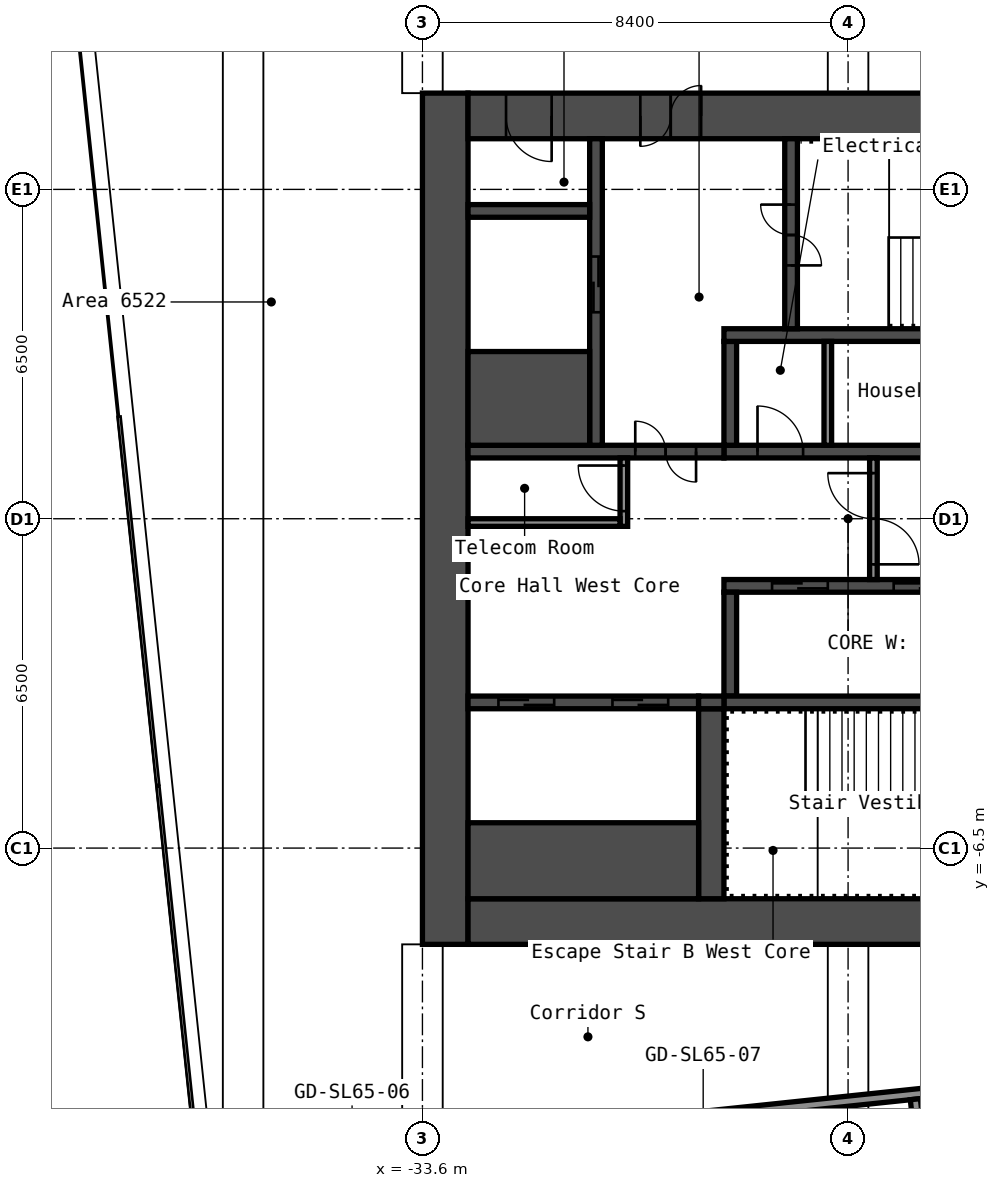
"""IFC4 building model, lengths in metres.
Left out: names, types, materials, properties, quantities, classifications, styles, units other than length and angle.
Written with IfcOpenShell. Run it as: python <this file> out.ifc"""

import sys

from ifc_helpers import new_model, si_unit, direction, frame, frame_2d, origin, place, context, subcontext, project, spatial, rectangle, extrude, element, fill, save


model = new_model("IFC4")
c1 = context("Model", 3, precision=1e-05, world=origin(), true_north=direction((0.0, 1.0)))
c2 = subcontext(c1, "Body", "Model", "MODEL_VIEW")
j1 = project(units=[si_unit("LENGTHUNIT", "METRE"), si_unit("PLANEANGLEUNIT", "RADIAN")], contexts=[c1])
p1 = place(None, origin())
s1 = spatial("IfcSite", under=j1, at=p1, CompositionType="ELEMENT")
p2 = place(p1, origin())
s2 = spatial("IfcBuilding", under=s1, at=p2, CompositionType="ELEMENT")
p3 = place(p2, frame((0.0, 0.0, 228.2)))
s3 = spatial("IfcBuildingStorey", under=s2, at=p3, CompositionType="ELEMENT", Elevation=228.2)
p4 = place(p3, frame((-33.15, -8.4, 0.0), z_axis=(0.0, 0.0, 1.0), x_axis=(0.0, 1.0, 0.0)))
e1 = element("IfcWall", 1, at=p4, inside=s3, PredefinedType="SHEAR", context=c2, shape_type="SweptSolid", body=[
    extrude(rectangle(XDim=16.8, YDim=0.9, at=frame_2d((8.4, 0.0))), origin(), (0.0, 0.0, 1.0), 4.1),
])
p5 = place(p3, frame((-32.7, 7.95, 0.0), z_axis=(0.0, 0.0, 1.0), x_axis=(1.0, 0.0, 0.0)))
e2 = element("IfcWall", 2, at=p5, inside=s3, PredefinedType="SHEAR", context=c2, shape_type="SweptSolid", body=[
    extrude(rectangle(XDim=15.0, YDim=0.9, at=frame_2d((7.5, 0.0))), origin(), (0.0, 0.0, 1.0), 4.1),
])
p6 = place(p5, frame((3.4, 0.0, 0.0)))
e3 = element("IfcOpeningElement", 3, at=p6, cuts=e2, PredefinedType="OPENING", context=c2, shape_type="SweptSolid", body=[
    extrude(rectangle(XDim=1.2, YDim=2.1, at=frame_2d((0.6, 1.05))), frame((0.0, 0.46, 0.0), z_axis=(0.0, -1.0, 0.0), x_axis=(1.0, 0.0, 0.0)), (0.0, 0.0, 1.0), 0.92),
])
p7 = place(p5, frame((0.75, 0.0, 0.0)))
e4 = element("IfcOpeningElement", 4, at=p7, cuts=e2, PredefinedType="OPENING", context=c2, shape_type="SweptSolid", body=[
    extrude(rectangle(XDim=0.9, YDim=2.1, at=frame_2d((0.45, 1.05))), frame((0.0, 0.46, 0.0), z_axis=(0.0, -1.0, 0.0), x_axis=(1.0, 0.0, 0.0)), (0.0, 0.0, 1.0), 0.92),
])
p8 = place(p3, frame((-32.7, -7.95, 0.0), z_axis=(0.0, 0.0, 1.0), x_axis=(1.0, 0.0, 0.0)))
e5 = element("IfcWall", 5, at=p8, inside=s3, PredefinedType="SHEAR", context=c2, shape_type="SweptSolid", body=[
    extrude(rectangle(XDim=15.0, YDim=0.9, at=frame_2d((7.5, 0.0))), origin(), (0.0, 0.0, 1.0), 4.1),
])
p9 = place(p8, frame((11.45, 0.0, 0.0)))
e6 = element("IfcOpeningElement", 6, at=p9, cuts=e5, PredefinedType="OPENING", context=c2, shape_type="SweptSolid", body=[
    extrude(rectangle(XDim=1.0, YDim=2.1, at=frame_2d((0.5, 1.05))), frame((0.0, 0.46, 0.0), z_axis=(0.0, -1.0, 0.0), x_axis=(1.0, 0.0, 0.0)), (0.0, 0.0, 1.0), 0.92),
])
p10 = place(p3, frame((-27.65, 1.325, 0.0), z_axis=(0.0, 0.0, 1.0), x_axis=(1.0, 0.0, 0.0)))
e7 = element("IfcWall", 7, at=p10, inside=s3, PredefinedType="SHEAR", context=c2, shape_type="SweptSolid", body=[
    extrude(rectangle(XDim=7.5, YDim=0.25, at=frame_2d((3.75, 0.0))), origin(), (0.0, 0.0, 1.0), 4.1),
])
p11 = place(p10, frame((4.363, 0.0, 0.0)))
e8 = element("IfcOpeningElement", 8, at=p11, cuts=e7, PredefinedType="OPENING", context=c2, shape_type="SweptSolid", body=[
    extrude(rectangle(XDim=0.9, YDim=2.1, at=frame_2d((0.45, 1.05))), frame((0.0, 0.135, 0.0), z_axis=(0.0, -1.0, 0.0), x_axis=(1.0, 0.0, 0.0)), (0.0, 0.0, 1.0), 0.27),
])
p12 = place(p10, frame((0.663, 0.0, 0.0)))
e9 = element("IfcOpeningElement", 9, at=p12, cuts=e7, PredefinedType="OPENING", context=c2, shape_type="SweptSolid", body=[
    extrude(rectangle(XDim=0.9, YDim=2.1, at=frame_2d((0.45, 1.05))), frame((0.0, 0.135, 0.0), z_axis=(0.0, -1.0, 0.0), x_axis=(1.0, 0.0, 0.0)), (0.0, 0.0, 1.0), 0.27),
])
p13 = place(p3, frame((-27.525, 1.45, 0.0), z_axis=(0.0, 0.0, 1.0), x_axis=(0.0, 1.0, 0.0)))
e10 = element("IfcWall", 10, at=p13, inside=s3, PredefinedType="SHEAR", context=c2, shape_type="SweptSolid", body=[
    extrude(rectangle(XDim=2.05, YDim=0.25, at=frame_2d((1.025, 0.0))), origin(), (0.0, 0.0, 1.0), 4.1),
])
p14 = place(p3, frame((-27.65, 3.625, 0.0), z_axis=(0.0, 0.0, 1.0), x_axis=(1.0, 0.0, 0.0)))
e11 = element("IfcWall", 11, at=p14, inside=s3, PredefinedType="SHEAR", context=c2, shape_type="SweptSolid", body=[
    extrude(rectangle(XDim=7.5, YDim=0.25, at=frame_2d((3.75, 0.0))), origin(), (0.0, 0.0, 1.0), 4.1),
])
p15 = place(p3, frame((-26.325, 3.75, 0.0), z_axis=(0.0, 0.0, 1.0), x_axis=(0.0, 1.0, 0.0)))
e12 = element("IfcWall", 12, at=p15, inside=s3, PredefinedType="SHEAR", context=c2, shape_type="SweptSolid", body=[
    extrude(rectangle(XDim=3.75, YDim=0.25, at=frame_2d((1.875, 0.0))), origin(), (0.0, 0.0, 1.0), 4.1),
])
p16 = place(p15, frame((1.25, 0.0, 0.0)))
e13 = element("IfcOpeningElement", 13, at=p16, cuts=e12, PredefinedType="OPENING", context=c2, shape_type="SweptSolid", body=[
    extrude(rectangle(XDim=1.2, YDim=2.1, at=frame_2d((0.6, 1.05))), frame((0.0, 0.135, 0.0), z_axis=(0.0, -1.0, 0.0), x_axis=(1.0, 0.0, 0.0)), (0.0, 0.0, 1.0), 0.27),
])
p17 = place(p3, frame((-32.7, 1.325, 0.0), z_axis=(0.0, 0.0, 1.0), x_axis=(1.0, 0.0, 0.0)))
e14 = element("IfcWall", 14, at=p17, inside=s3, PredefinedType="SHEAR", context=c2, shape_type="SweptSolid", body=[
    extrude(rectangle(XDim=5.05, YDim=0.25, at=frame_2d((2.525, 0.0))), origin(), (0.0, 0.0, 1.0), 4.1),
])
p18 = place(p17, frame((3.3, 0.0, 0.0)))
e15 = element("IfcOpeningElement", 15, at=p18, cuts=e14, PredefinedType="OPENING", context=c2, shape_type="SweptSolid", body=[
    extrude(rectangle(XDim=1.2, YDim=2.1, at=frame_2d((0.6, 1.05))), frame((0.0, 0.135, 0.0), z_axis=(0.0, -1.0, 0.0), x_axis=(1.0, 0.0, 0.0)), (0.0, 0.0, 1.0), 0.27),
])
p19 = place(p3, frame((-30.175, 1.45, 0.0), z_axis=(0.0, 0.0, 1.0), x_axis=(0.0, 1.0, 0.0)))
e16 = element("IfcWall", 16, at=p19, inside=s3, PredefinedType="SHEAR", context=c2, shape_type="SweptSolid", body=[
    extrude(rectangle(XDim=6.05, YDim=0.25, at=frame_2d((3.025, 0.0))), origin(), (0.0, 0.0, 1.0), 4.1),
])
p20 = place(p19, frame((2.625, 0.0, 0.0)))
e17 = element("IfcOpeningElement", 17, at=p20, cuts=e16, PredefinedType="OPENING", context=c2, shape_type="SweptSolid", body=[
    extrude(rectangle(XDim=1.1, YDim=2.1, at=frame_2d((0.55, 1.05))), frame((0.0, 0.135, 0.0), z_axis=(0.0, -1.0, 0.0), x_axis=(1.0, 0.0, 0.0)), (0.0, 0.0, 1.0), 0.27),
])
p21 = place(p3, frame((-32.7, 2.375, 0.0), z_axis=(0.0, 0.0, 1.0), x_axis=(1.0, 0.0, 0.0)))
e18 = element("IfcWall", 18, at=p21, inside=s3, PredefinedType="SHEAR", context=c2, shape_type="SweptSolid", body=[
    extrude(rectangle(XDim=2.4, YDim=1.85, at=frame_2d((1.2, 0.0))), origin(), (0.0, 0.0, 1.0), 4.1),
])
p22 = place(p3, frame((-32.7, 6.075, 0.0), z_axis=(0.0, 0.0, 1.0), x_axis=(1.0, 0.0, 0.0)))
e19 = element("IfcWall", 19, at=p22, inside=s3, PredefinedType="SHEAR", context=c2, shape_type="SweptSolid", body=[
    extrude(rectangle(XDim=2.4, YDim=0.25, at=frame_2d((1.2, 0.0))), origin(), (0.0, 0.0, 1.0), 4.1),
])
p23 = place(p3, frame((-27.65, -1.325, 0.0), z_axis=(0.0, 0.0, 1.0), x_axis=(1.0, 0.0, 0.0)))
e20 = element("IfcWall", 20, at=p23, inside=s3, PredefinedType="SHEAR", context=c2, shape_type="SweptSolid", body=[
    extrude(rectangle(XDim=7.5, YDim=0.25, at=frame_2d((3.75, 0.0))), origin(), (0.0, 0.0, 1.0), 4.1),
])
p24 = place(p23, frame((5.75, 0.0, 0.0)))
e21 = element("IfcOpeningElement", 21, at=p24, cuts=e20, PredefinedType="OPENING", context=c2, shape_type="SweptSolid", body=[
    extrude(rectangle(XDim=1.1, YDim=2.1, at=frame_2d((0.55, 1.05))), frame((0.0, 0.135, 0.0), z_axis=(0.0, -1.0, 0.0), x_axis=(1.0, 0.0, 0.0)), (0.0, 0.0, 1.0), 0.27),
])
p25 = place(p23, frame((3.35, 0.0, 0.0)))
e22 = element("IfcOpeningElement", 22, at=p25, cuts=e20, PredefinedType="OPENING", context=c2, shape_type="SweptSolid", body=[
    extrude(rectangle(XDim=1.1, YDim=2.1, at=frame_2d((0.55, 1.05))), frame((0.0, 0.135, 0.0), z_axis=(0.0, -1.0, 0.0), x_axis=(1.0, 0.0, 0.0)), (0.0, 0.0, 1.0), 0.27),
])
p26 = place(p23, frame((0.95, 0.0, 0.0)))
e23 = element("IfcOpeningElement", 23, at=p26, cuts=e20, PredefinedType="OPENING", context=c2, shape_type="SweptSolid", body=[
    extrude(rectangle(XDim=1.1, YDim=2.1, at=frame_2d((0.55, 1.05))), frame((0.0, 0.135, 0.0), z_axis=(0.0, -1.0, 0.0), x_axis=(1.0, 0.0, 0.0)), (0.0, 0.0, 1.0), 0.27),
])
p27 = place(p3, frame((-27.525, -3.5, 0.0), z_axis=(0.0, 0.0, 1.0), x_axis=(0.0, 1.0, 0.0)))
e24 = element("IfcWall", 24, at=p27, inside=s3, PredefinedType="SHEAR", context=c2, shape_type="SweptSolid", body=[
    extrude(rectangle(XDim=2.05, YDim=0.25, at=frame_2d((1.025, 0.0))), origin(), (0.0, 0.0, 1.0), 4.1),
])
p28 = place(p3, frame((-27.65, -3.625, 0.0), z_axis=(0.0, 0.0, 1.0), x_axis=(1.0, 0.0, 0.0)))
e25 = element("IfcWall", 25, at=p28, inside=s3, PredefinedType="SHEAR", context=c2, shape_type="SweptSolid", body=[
    extrude(rectangle(XDim=7.5, YDim=0.25, at=frame_2d((3.75, 0.0))), origin(), (0.0, 0.0, 1.0), 4.1),
])
p29 = place(p3, frame((-27.9, -7.5, 0.0), z_axis=(0.0, 0.0, 1.0), x_axis=(0.0, 1.0, 0.0)))
e26 = element("IfcWall", 26, at=p29, inside=s3, PredefinedType="SHEAR", context=c2, shape_type="SweptSolid", body=[
    extrude(rectangle(XDim=3.75, YDim=0.5, at=frame_2d((1.875, 0.0))), origin(), (0.0, 0.0, 1.0), 4.1),
])
p30 = place(p3, frame((-32.7, -3.625, 0.0), z_axis=(0.0, 0.0, 1.0), x_axis=(1.0, 0.0, 0.0)))
e27 = element("IfcWall", 27, at=p30, inside=s3, PredefinedType="SHEAR", context=c2, shape_type="SweptSolid", body=[
    extrude(rectangle(XDim=4.55, YDim=0.25, at=frame_2d((2.275, 0.0))), origin(), (0.0, 0.0, 1.0), 4.1),
])
p31 = place(p30, frame((2.85, 0.0, 0.0)))
e28 = element("IfcOpeningElement", 28, at=p31, cuts=e27, PredefinedType="OPENING", context=c2, shape_type="SweptSolid", body=[
    extrude(rectangle(XDim=1.1, YDim=2.1, at=frame_2d((0.55, 1.05))), frame((0.0, 0.135, 0.0), z_axis=(0.0, -1.0, 0.0), x_axis=(1.0, 0.0, 0.0)), (0.0, 0.0, 1.0), 0.27),
])
p32 = place(p30, frame((0.6, 0.0, 0.0)))
e29 = element("IfcOpeningElement", 29, at=p32, cuts=e27, PredefinedType="OPENING", context=c2, shape_type="SweptSolid", body=[
    extrude(rectangle(XDim=1.1, YDim=2.1, at=frame_2d((0.55, 1.05))), frame((0.0, 0.135, 0.0), z_axis=(0.0, -1.0, 0.0), x_axis=(1.0, 0.0, 0.0)), (0.0, 0.0, 1.0), 0.27),
])
p33 = place(p3, frame((-32.7, -6.75, 0.0), z_axis=(0.0, 0.0, 1.0), x_axis=(1.0, 0.0, 0.0)))
e30 = element("IfcWall", 30, at=p33, inside=s3, PredefinedType="SHEAR", context=c2, shape_type="SweptSolid", body=[
    extrude(rectangle(XDim=4.55, YDim=1.5, at=frame_2d((2.275, 0.0))), origin(), (0.0, 0.0, 1.0), 4.1),
])
p34 = place(p3, frame((-28.15, -3.625, 0.0), z_axis=(0.0, 0.0, 1.0), x_axis=(1.0, 0.0, 0.0)))
e31 = element("IfcWall", 31, at=p34, inside=s3, PredefinedType="SHEAR", context=c2, shape_type="SweptSolid", body=[
    extrude(rectangle(XDim=0.5, YDim=0.25, at=frame_2d((0.25, 0.0))), origin(), (0.0, 0.0, 1.0), 4.1),
])
p35 = place(p3, frame((-24.7, -1.2, 0.0), z_axis=(0.0, 0.0, 1.0), x_axis=(0.0, 1.0, 0.0)))
e32 = element("IfcWall", 32, at=p35, inside=s3, PredefinedType="PARTITIONING", context=c2, shape_type="SweptSolid", body=[
    extrude(rectangle(XDim=2.4, YDim=0.15, at=frame_2d((1.2, 0.0))), origin(), (0.0, 0.0, 1.0), 4.1),
])
p36 = place(p35, frame((0.3, 0.0, 0.0)))
e33 = element("IfcOpeningElement", 33, at=p36, cuts=e32, PredefinedType="OPENING", context=c2, shape_type="SweptSolid", body=[
    extrude(rectangle(XDim=1.8, YDim=2.1, at=frame_2d((0.9, 1.05))), frame((0.0, 0.085, 0.0), z_axis=(0.0, -1.0, 0.0), x_axis=(1.0, 0.0, 0.0)), (0.0, 0.0, 1.0), 0.17),
])
p37 = place(p3, frame((-29.625, -0.15, 0.0), z_axis=(0.0, 0.0, 1.0), x_axis=(0.0, 1.0, 0.0)))
e34 = element("IfcWall", 34, at=p37, inside=s3, PredefinedType="PARTITIONING", context=c2, shape_type="SweptSolid", body=[
    extrude(rectangle(XDim=1.35, YDim=0.15, at=frame_2d((0.675, 0.0))), origin(), (0.0, 0.0, 1.0), 4.1),
])
p38 = place(p37, frame((0.3, 0.0, 0.0)))
e35 = element("IfcOpeningElement", 35, at=p38, cuts=e34, PredefinedType="OPENING", context=c2, shape_type="SweptSolid", body=[
    extrude(rectangle(XDim=0.9, YDim=2.1, at=frame_2d((0.45, 1.05))), frame((0.0, 0.085, 0.0), z_axis=(0.0, -1.0, 0.0), x_axis=(1.0, 0.0, 0.0)), (0.0, 0.0, 1.0), 0.17),
])
p39 = place(p3, frame((-32.7, -0.075, 0.0), z_axis=(0.0, 0.0, 1.0), x_axis=(1.0, 0.0, 0.0)))
e36 = element("IfcWall", 36, at=p39, inside=s3, PredefinedType="PARTITIONING", context=c2, shape_type="SweptSolid", body=[
    extrude(rectangle(XDim=3.0, YDim=0.15, at=frame_2d((1.5, 0.0))), origin(), (0.0, 0.0, 1.0), 4.1),
])
p40 = place(p3, frame((-25.6, 1.45, 0.0), z_axis=(0.0, 0.0, 1.0), x_axis=(0.0, 1.0, 0.0)))
e37 = element("IfcWall", 37, at=p40, inside=s3, PredefinedType="PARTITIONING", context=c2, shape_type="SweptSolid", body=[
    extrude(rectangle(XDim=2.05, YDim=0.15, at=frame_2d((1.025, 0.0))), origin(), (0.0, 0.0, 1.0), 4.1),
])
p41 = place(p3, frame((-38.039, -12.844, 0.0), z_axis=(0.0, 0.0, 1.0), x_axis=(0.994521812173, 0.104529254816, 0.0)))
e38 = element("IfcWall", 38, at=p41, inside=s3, PredefinedType="PARTITIONING", context=c2, shape_type="SweptSolid", body=[
    extrude(rectangle(XDim=22.635, YDim=0.2, at=frame_2d((11.317, 0.0))), origin(), (0.0, 0.0, 1.0), 4.1),
])
p42 = place(p41, frame((2.567, 0.0, 0.0)))
e39 = element("IfcOpeningElement", 39, at=p42, cuts=e38, PredefinedType="OPENING", context=c2, shape_type="SweptSolid", body=[
    extrude(rectangle(XDim=1.0, YDim=2.1, at=frame_2d((0.5, 1.05))), frame((0.0, 0.11, 0.0), z_axis=(0.0, -1.0, 0.0), x_axis=(1.0, 0.0, 0.0)), (0.0, 0.0, 1.0), 0.22),
])
p43 = place(p41, frame((9.585, 0.0, 0.0)))
e40 = element("IfcOpeningElement", 40, at=p43, cuts=e38, PredefinedType="OPENING", context=c2, shape_type="SweptSolid", body=[
    extrude(rectangle(XDim=0.9, YDim=2.1, at=frame_2d((0.45, 1.05))), frame((0.0, 0.11, 0.0), z_axis=(0.0, -1.0, 0.0), x_axis=(1.0, 0.0, 0.0)), (0.0, 0.0, 1.0), 0.22),
])
p44 = place(p41, frame((17.985, 0.0, 0.0)))
e41 = element("IfcOpeningElement", 41, at=p44, cuts=e38, PredefinedType="OPENING", context=c2, shape_type="SweptSolid", body=[
    extrude(rectangle(XDim=0.9, YDim=2.1, at=frame_2d((0.45, 1.05))), frame((0.0, 0.11, 0.0), z_axis=(0.0, -1.0, 0.0), x_axis=(1.0, 0.0, 0.0)), (0.0, 0.0, 1.0), 0.22),
])
p45 = place(p3, frame((-22.805, -21.606, 0.0), z_axis=(0.0, 0.0, 1.0), x_axis=(-0.104535358167, 0.994521170661, 0.0)))
e42 = element("IfcWall", 42, at=p45, inside=s3, PredefinedType="PARTITIONING", context=c2, shape_type="SweptSolid", body=[
    extrude(rectangle(XDim=10.206, YDim=0.2, at=frame_2d((5.103, 0.0))), origin(), (0.0, 0.0, 1.0), 4.1),
])
p46 = place(p6, origin())
e43 = element("IfcDoor", 43, at=p46, inside=s3, OperationType="DOUBLE_DOOR_SINGLE_SWING", PredefinedType="DOOR", context=c2, shape_type="SweptSolid", body=[
    extrude(rectangle(XDim=1.2, YDim=2.1, at=frame_2d((0.6, 1.05))), frame((0.0, 0.025, 0.0), z_axis=(0.0, -1.0, 0.0), x_axis=(1.0, 0.0, 0.0)), (0.0, 0.0, 1.0), 0.05),
])
fill(e3, e43)
p47 = place(p7, origin())
e44 = element("IfcDoor", 44, at=p47, inside=s3, OperationType="SINGLE_SWING_RIGHT", PredefinedType="DOOR", context=c2, shape_type="SweptSolid", body=[
    extrude(rectangle(XDim=0.9, YDim=2.1, at=frame_2d((0.45, 1.05))), frame((0.0, 0.025, 0.0), z_axis=(0.0, -1.0, 0.0), x_axis=(1.0, 0.0, 0.0)), (0.0, 0.0, 1.0), 0.05),
])
fill(e4, e44)
p48 = place(p16, origin())
e45 = element("IfcDoor", 45, at=p48, inside=s3, OperationType="DOUBLE_DOOR_SINGLE_SWING", PredefinedType="DOOR", context=c2, shape_type="SweptSolid", body=[
    extrude(rectangle(XDim=1.2, YDim=2.1, at=frame_2d((0.6, 1.05))), frame((0.0, 0.025, 0.0), z_axis=(0.0, -1.0, 0.0), x_axis=(1.0, 0.0, 0.0)), (0.0, 0.0, 1.0), 0.05),
])
fill(e13, e45)
p49 = place(p18, origin())
e46 = element("IfcDoor", 46, at=p49, inside=s3, OperationType="DOUBLE_DOOR_SINGLE_SWING", PredefinedType="DOOR", context=c2, shape_type="SweptSolid", body=[
    extrude(rectangle(XDim=1.2, YDim=2.1, at=frame_2d((0.6, 1.05))), frame((0.0, 0.025, 0.0), z_axis=(0.0, -1.0, 0.0), x_axis=(1.0, 0.0, 0.0)), (0.0, 0.0, 1.0), 0.05),
])
fill(e15, e46)
p50 = place(p36, origin())
e47 = element("IfcDoor", 47, at=p50, inside=s3, OperationType="DOUBLE_DOOR_SINGLE_SWING", PredefinedType="DOOR", context=c2, shape_type="SweptSolid", body=[
    extrude(rectangle(XDim=1.8, YDim=2.1, at=frame_2d((0.9, 1.05))), frame((0.0, 0.025, 0.0), z_axis=(0.0, -1.0, 0.0), x_axis=(1.0, 0.0, 0.0)), (0.0, 0.0, 1.0), 0.05),
])
fill(e33, e47)
p51 = place(p38, origin())
e48 = element("IfcDoor", 48, at=p51, inside=s3, OperationType="SINGLE_SWING_LEFT", PredefinedType="DOOR", context=c2, shape_type="SweptSolid", body=[
    extrude(rectangle(XDim=0.9, YDim=2.1, at=frame_2d((0.45, 1.05))), frame((0.0, 0.025, 0.0), z_axis=(0.0, -1.0, 0.0), x_axis=(1.0, 0.0, 0.0)), (0.0, 0.0, 1.0), 0.05),
])
fill(e35, e48)
p52 = place(p12, origin())
e49 = element("IfcDoor", 49, at=p52, inside=s3, OperationType="SINGLE_SWING_RIGHT", PredefinedType="DOOR", context=c2, shape_type="SweptSolid", body=[
    extrude(rectangle(XDim=0.9, YDim=2.1, at=frame_2d((0.45, 1.05))), frame((0.0, 0.025, 0.0), z_axis=(0.0, -1.0, 0.0), x_axis=(1.0, 0.0, 0.0)), (0.0, 0.0, 1.0), 0.05),
])
fill(e9, e49)
p53 = place(p25, origin())
e50 = element("IfcDoor", 50, at=p53, inside=s3, OperationType="DOUBLE_DOOR_SLIDING", PredefinedType="DOOR", context=c2, shape_type="SweptSolid", body=[
    extrude(rectangle(XDim=1.1, YDim=2.1, at=frame_2d((0.55, 1.05))), frame((0.0, 0.025, 0.0), z_axis=(0.0, -1.0, 0.0), x_axis=(1.0, 0.0, 0.0)), (0.0, 0.0, 1.0), 0.05),
])
fill(e22, e50)
p54 = place(p26, origin())
e51 = element("IfcDoor", 51, at=p54, inside=s3, OperationType="DOUBLE_DOOR_SLIDING", PredefinedType="DOOR", context=c2, shape_type="SweptSolid", body=[
    extrude(rectangle(XDim=1.1, YDim=2.1, at=frame_2d((0.55, 1.05))), frame((0.0, 0.025, 0.0), z_axis=(0.0, -1.0, 0.0), x_axis=(1.0, 0.0, 0.0)), (0.0, 0.0, 1.0), 0.05),
])
fill(e23, e51)
p55 = place(p20, origin())
e52 = element("IfcDoor", 52, at=p55, inside=s3, OperationType="DOUBLE_DOOR_SLIDING", PredefinedType="DOOR", context=c2, shape_type="SweptSolid", body=[
    extrude(rectangle(XDim=1.1, YDim=2.1, at=frame_2d((0.55, 1.05))), frame((0.0, 0.025, 0.0), z_axis=(0.0, -1.0, 0.0), x_axis=(1.0, 0.0, 0.0)), (0.0, 0.0, 1.0), 0.05),
])
fill(e17, e52)
p56 = place(p31, origin())
e53 = element("IfcDoor", 53, at=p56, inside=s3, OperationType="DOUBLE_DOOR_SLIDING", PredefinedType="DOOR", context=c2, shape_type="SweptSolid", body=[
    extrude(rectangle(XDim=1.1, YDim=2.1, at=frame_2d((0.55, 1.05))), frame((0.0, 0.025, 0.0), z_axis=(0.0, -1.0, 0.0), x_axis=(1.0, 0.0, 0.0)), (0.0, 0.0, 1.0), 0.05),
])
fill(e28, e53)
p57 = place(p32, origin())
e54 = element("IfcDoor", 54, at=p57, inside=s3, OperationType="DOUBLE_DOOR_SLIDING", PredefinedType="DOOR", context=c2, shape_type="SweptSolid", body=[
    extrude(rectangle(XDim=1.1, YDim=2.1, at=frame_2d((0.55, 1.05))), frame((0.0, 0.025, 0.0), z_axis=(0.0, -1.0, 0.0), x_axis=(1.0, 0.0, 0.0)), (0.0, 0.0, 1.0), 0.05),
])
fill(e29, e54)
save(model, sys.argv[1])
